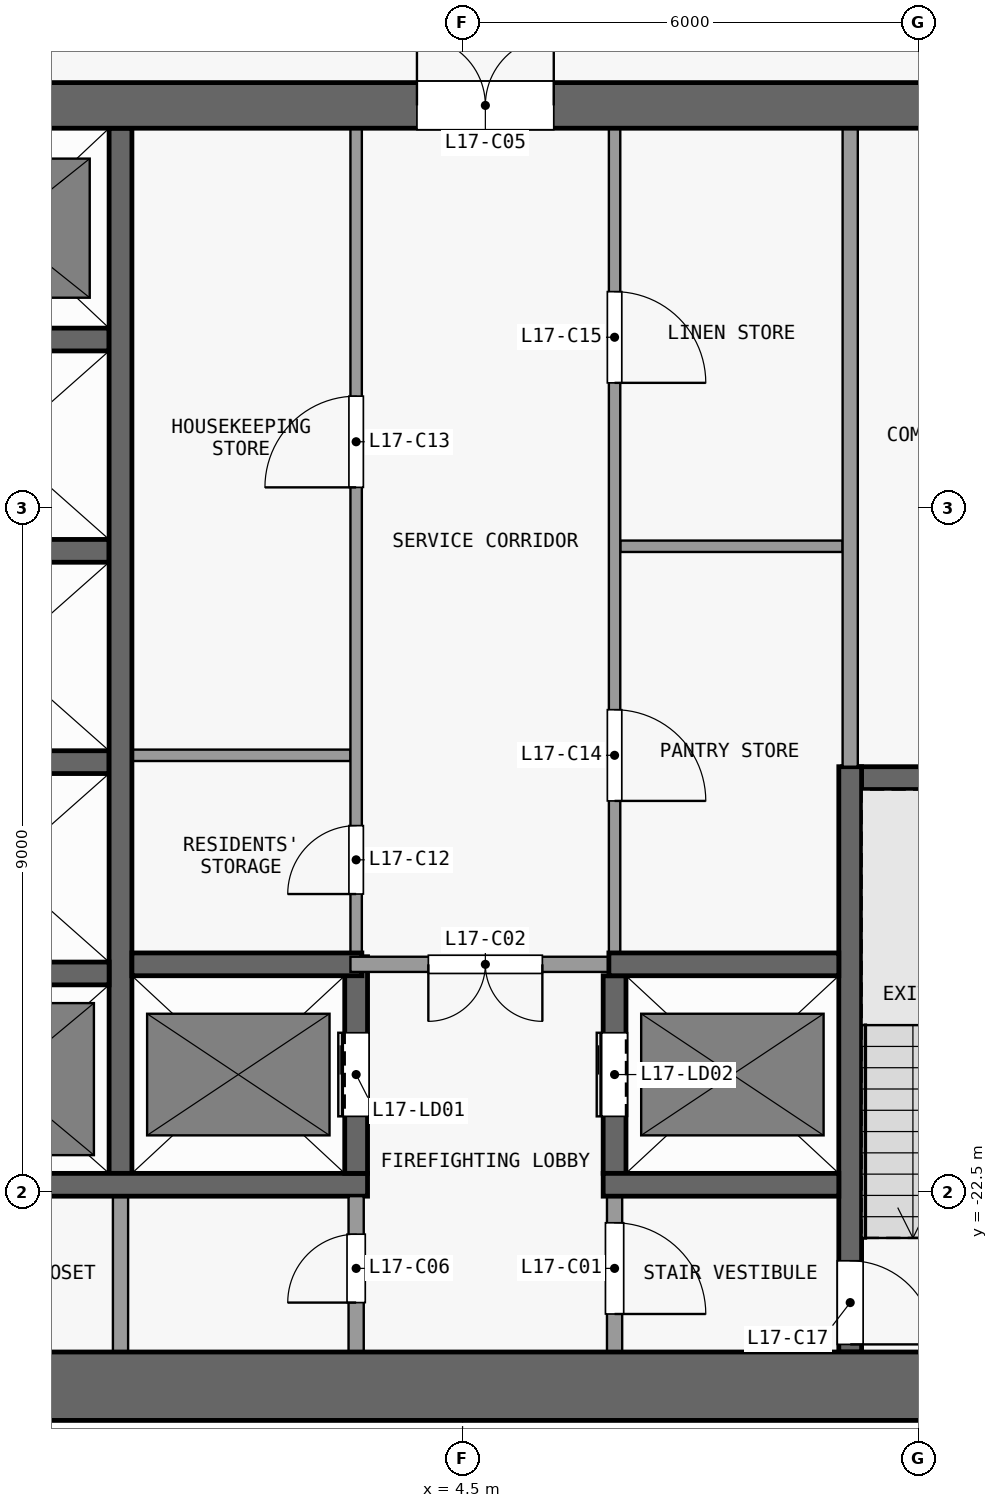
"""IFC4 building model, lengths in metres.
Left out: names, types, materials, properties, quantities, classifications, styles, units other than length and angle.
Written with IfcOpenShell. Run it as: python <this file> out.ifc"""

import sys

from ifc_helpers import new_model, si_unit, direction, frame, frame_2d, origin, place, context, subcontext, project, spatial, rectangle, extrude, element, fill, save


model = new_model("IFC4")
c1 = context("Model", 3, precision=1e-05, world=origin(), true_north=direction((0.0, 1.0)))
c2 = subcontext(c1, "Body", "Model", "MODEL_VIEW")
j1 = project(units=[si_unit("LENGTHUNIT", "METRE"), si_unit("PLANEANGLEUNIT", "RADIAN")], contexts=[c1])
p1 = place(None, origin())
s1 = spatial("IfcSite", under=j1, at=p1, CompositionType="ELEMENT")
p2 = place(p1, origin())
s2 = spatial("IfcBuilding", under=s1, at=p2, CompositionType="ELEMENT")
p3 = place(p2, frame((0.0, 0.0, 72.1)))
s3 = spatial("IfcBuildingStorey", under=s2, at=p3, CompositionType="ELEMENT", Elevation=72.1)
p4 = place(p3, frame((-13.5, -25.05, 0.0), z_axis=(0.0, 0.0, 1.0), x_axis=(1.0, 0.0, 0.0)))
e1 = element("IfcWall", 1, at=p4, inside=s3, PredefinedType="SHEAR", context=c2, shape_type="SweptSolid", body=[
    extrude(rectangle(XDim=27.0, YDim=0.9, at=frame_2d((13.5, 0.0))), origin(), (0.0, 0.0, 1.0), 3.15),
])
p5 = place(p3, frame((-13.5, -8.2, 0.0), z_axis=(0.0, 0.0, 1.0), x_axis=(1.0, 0.0, 0.0)))
e2 = element("IfcWall", 2, at=p5, inside=s3, PredefinedType="SHEAR", context=c2, shape_type="SweptSolid", body=[
    extrude(rectangle(XDim=27.0, YDim=0.6, at=frame_2d((13.5, 0.0))), origin(), (0.0, 0.0, 1.0), 3.15),
])
p6 = place(p5, frame((7.8, 0.0, 0.0)))
e3 = element("IfcOpeningElement", 3, at=p6, cuts=e2, PredefinedType="OPENING", context=c2, shape_type="SweptSolid", body=[
    extrude(rectangle(XDim=1.8, YDim=2.1, at=frame_2d((0.9, 1.05))), frame((0.0, 0.31, 0.0), z_axis=(0.0, -1.0, 0.0), x_axis=(1.0, 0.0, 0.0)), (0.0, 0.0, 1.0), 0.62),
])
p7 = place(p5, frame((17.4, 0.0, 0.0)))
e4 = element("IfcOpeningElement", 4, at=p7, cuts=e2, PredefinedType="OPENING", context=c2, shape_type="SweptSolid", body=[
    extrude(rectangle(XDim=1.8, YDim=2.1, at=frame_2d((0.9, 1.05))), frame((0.0, 0.31, 0.0), z_axis=(0.0, -1.0, 0.0), x_axis=(1.0, 0.0, 0.0)), (0.0, 0.0, 1.0), 0.62),
])
p8 = place(p5, frame((2.725, 0.0, 0.0)))
e5 = element("IfcOpeningElement", 5, at=p8, cuts=e2, PredefinedType="OPENING", context=c2, shape_type="SweptSolid", body=[
    extrude(rectangle(XDim=0.9, YDim=2.1, at=frame_2d((0.45, 1.05))), frame((0.0, 0.31, 0.0), z_axis=(0.0, -1.0, 0.0), x_axis=(1.0, 0.0, 0.0)), (0.0, 0.0, 1.0), 0.62),
])
p9 = place(p5, frame((24.075, 0.0, 0.0)))
e6 = element("IfcOpeningElement", 6, at=p9, cuts=e2, PredefinedType="OPENING", context=c2, shape_type="SweptSolid", body=[
    extrude(rectangle(XDim=1.2, YDim=2.1, at=frame_2d((0.6, 1.05))), frame((0.0, 0.31, 0.0), z_axis=(0.0, -1.0, 0.0), x_axis=(1.0, 0.0, 0.0)), (0.0, 0.0, 1.0), 0.62),
])
p10 = place(p3, frame((-2.95, -22.4, 0.0), z_axis=(0.0, 0.0, 1.0), x_axis=(1.0, 0.0, 0.0)))
e7 = element("IfcWall", 7, at=p10, inside=s3, PredefinedType="SHEAR", context=c2, shape_type="SweptSolid", body=[
    extrude(rectangle(XDim=6.2, YDim=0.3, at=frame_2d((3.1, 0.0))), origin(), (0.0, 0.0, 1.0), 3.15),
])
p11 = place(p3, frame((6.35, -22.4, 0.0), z_axis=(0.0, 0.0, 1.0), x_axis=(1.0, 0.0, 0.0)))
e8 = element("IfcWall", 8, at=p11, inside=s3, PredefinedType="SHEAR", context=c2, shape_type="SweptSolid", body=[
    extrude(rectangle(XDim=3.1, YDim=0.3, at=frame_2d((1.55, 0.0))), origin(), (0.0, 0.0, 1.0), 3.15),
])
p12 = place(p3, frame((-2.95, -19.62, 0.0), z_axis=(0.0, 0.0, 1.0), x_axis=(1.0, 0.0, 0.0)))
e9 = element("IfcWall", 9, at=p12, inside=s3, PredefinedType="SHEAR", context=c2, shape_type="SweptSolid", body=[
    extrude(rectangle(XDim=2.8, YDim=0.3, at=frame_2d((1.4, 0.0))), origin(), (0.0, 0.0, 1.0), 3.15),
])
p13 = place(p3, frame((0.15, -19.5, 0.0), z_axis=(0.0, 0.0, 1.0), x_axis=(1.0, 0.0, 0.0)))
e10 = element("IfcWall", 10, at=p13, inside=s3, PredefinedType="SHEAR", context=c2, shape_type="SweptSolid", body=[
    extrude(rectangle(XDim=3.025, YDim=0.3, at=frame_2d((1.513, 0.0))), origin(), (0.0, 0.0, 1.0), 3.15),
])
p14 = place(p3, frame((6.575, -19.5, 0.0), z_axis=(0.0, 0.0, 1.0), x_axis=(-1.0, 0.0, 0.0)))
e11 = element("IfcWall", 11, at=p14, inside=s3, PredefinedType="PARTITIONING", context=c2, shape_type="SweptSolid", body=[
    extrude(rectangle(XDim=3.55, YDim=0.2, at=frame_2d((1.775, 0.0))), origin(), (0.0, 0.0, 1.0), 3.15),
])
p15 = place(p14, frame((1.025, 0.0, 0.0)))
e12 = element("IfcOpeningElement", 12, at=p15, cuts=e11, PredefinedType="OPENING", context=c2, shape_type="SweptSolid", body=[
    extrude(rectangle(XDim=1.5, YDim=2.1, at=frame_2d((0.75, 1.05))), frame((0.0, 0.11, 0.0), z_axis=(0.0, -1.0, 0.0), x_axis=(1.0, 0.0, 0.0)), (0.0, 0.0, 1.0), 0.22),
])
p16 = place(p3, frame((6.425, -19.5, 0.0), z_axis=(0.0, 0.0, 1.0), x_axis=(1.0, 0.0, 0.0)))
e13 = element("IfcWall", 13, at=p16, inside=s3, PredefinedType="SHEAR", context=c2, shape_type="SweptSolid", body=[
    extrude(rectangle(XDim=3.025, YDim=0.3, at=frame_2d((1.512, 0.0))), origin(), (0.0, 0.0, 1.0), 3.15),
])
p17 = place(p3, frame((9.5, -17.05, 0.0), z_axis=(0.0, 0.0, 1.0), x_axis=(1.0, 0.0, 0.0)))
e14 = element("IfcWall", 14, at=p17, inside=s3, PredefinedType="SHEAR", context=c2, shape_type="SweptSolid", body=[
    extrude(rectangle(XDim=3.1, YDim=0.3, at=frame_2d((1.55, 0.0))), origin(), (0.0, 0.0, 1.0), 3.15),
])
p18 = place(p3, frame((-2.95, -16.84, 0.0), z_axis=(0.0, 0.0, 1.0), x_axis=(1.0, 0.0, 0.0)))
e15 = element("IfcWall", 15, at=p18, inside=s3, PredefinedType="SHEAR", context=c2, shape_type="SweptSolid", body=[
    extrude(rectangle(XDim=2.8, YDim=0.3, at=frame_2d((1.4, 0.0))), origin(), (0.0, 0.0, 1.0), 3.15),
])
p19 = place(p3, frame((0.15, -16.75, 0.0), z_axis=(0.0, 0.0, 1.0), x_axis=(1.0, 0.0, 0.0)))
e16 = element("IfcWall", 16, at=p19, inside=s3, PredefinedType="PARTITIONING", context=c2, shape_type="SweptSolid", body=[
    extrude(rectangle(XDim=2.875, YDim=0.15, at=frame_2d((1.438, 0.0))), origin(), (0.0, 0.0, 1.0), 3.15),
])
p20 = place(p3, frame((-2.95, -14.06, 0.0), z_axis=(0.0, 0.0, 1.0), x_axis=(1.0, 0.0, 0.0)))
e17 = element("IfcWall", 17, at=p20, inside=s3, PredefinedType="SHEAR", context=c2, shape_type="SweptSolid", body=[
    extrude(rectangle(XDim=2.8, YDim=0.3, at=frame_2d((1.4, 0.0))), origin(), (0.0, 0.0, 1.0), 3.15),
])
p21 = place(p3, frame((6.575, -14.0, 0.0), z_axis=(0.0, 0.0, 1.0), x_axis=(1.0, 0.0, 0.0)))
e18 = element("IfcWall", 18, at=p21, inside=s3, PredefinedType="PARTITIONING", context=c2, shape_type="SweptSolid", body=[
    extrude(rectangle(XDim=2.925, YDim=0.15, at=frame_2d((1.462, 0.0))), origin(), (0.0, 0.0, 1.0), 3.15),
])
p22 = place(p3, frame((-2.95, -11.28, 0.0), z_axis=(0.0, 0.0, 1.0), x_axis=(1.0, 0.0, 0.0)))
e19 = element("IfcWall", 19, at=p22, inside=s3, PredefinedType="SHEAR", context=c2, shape_type="SweptSolid", body=[
    extrude(rectangle(XDim=2.8, YDim=0.3, at=frame_2d((1.4, 0.0))), origin(), (0.0, 0.0, 1.0), 3.15),
])
p23 = place(p3, frame((0.0, -24.6, 0.0), z_axis=(0.0, 0.0, 1.0), x_axis=(0.0, 1.0, 0.0)))
e20 = element("IfcWall", 20, at=p23, inside=s3, PredefinedType="PARTITIONING", context=c2, shape_type="SweptSolid", body=[
    extrude(rectangle(XDim=2.05, YDim=0.2, at=frame_2d((1.025, 0.0))), origin(), (0.0, 0.0, 1.0), 3.15),
])
p24 = place(p3, frame((0.0, -22.25, 0.0), z_axis=(0.0, 0.0, 1.0), x_axis=(0.0, 1.0, 0.0)))
e21 = element("IfcWall", 21, at=p24, inside=s3, PredefinedType="SHEAR", context=c2, shape_type="SweptSolid", body=[
    extrude(rectangle(XDim=13.75, YDim=0.3, at=frame_2d((6.875, 0.0))), origin(), (0.0, 0.0, 1.0), 3.15),
])
p25 = place(p3, frame((3.1, -24.6, 0.0), z_axis=(0.0, 0.0, 1.0), x_axis=(0.0, 1.0, 0.0)))
e22 = element("IfcWall", 22, at=p25, inside=s3, PredefinedType="PARTITIONING", context=c2, shape_type="SweptSolid", body=[
    extrude(rectangle(XDim=2.05, YDim=0.2, at=frame_2d((1.025, 0.0))), origin(), (0.0, 0.0, 1.0), 3.15),
])
p26 = place(p25, frame((0.65, 0.0, 0.0)))
e23 = element("IfcOpeningElement", 23, at=p26, cuts=e22, PredefinedType="OPENING", context=c2, shape_type="SweptSolid", body=[
    extrude(rectangle(XDim=0.9, YDim=2.1, at=frame_2d((0.45, 1.05))), frame((0.0, 0.11, 0.0), z_axis=(0.0, -1.0, 0.0), x_axis=(1.0, 0.0, 0.0)), (0.0, 0.0, 1.0), 0.22),
])
p27 = place(p3, frame((3.1, -22.25, 0.0), z_axis=(0.0, 0.0, 1.0), x_axis=(0.0, 1.0, 0.0)))
e24 = element("IfcWall", 24, at=p27, inside=s3, PredefinedType="SHEAR", context=c2, shape_type="SweptSolid", body=[
    extrude(rectangle(XDim=2.85, YDim=0.3, at=frame_2d((1.425, 0.0))), origin(), (0.0, 0.0, 1.0), 3.15),
])
p28 = place(p27, frame((0.75, 0.0, 0.0)))
e25 = element("IfcOpeningElement", 25, at=p28, cuts=e24, PredefinedType="OPENING", context=c2, shape_type="SweptSolid", body=[
    extrude(rectangle(XDim=1.1, YDim=2.1, at=frame_2d((0.55, 1.05))), frame((0.0, 0.16, 0.0), z_axis=(0.0, -1.0, 0.0), x_axis=(1.0, 0.0, 0.0)), (0.0, 0.0, 1.0), 0.32),
])
p29 = place(p3, frame((3.1, -19.4, 0.0), z_axis=(0.0, 0.0, 1.0), x_axis=(0.0, 1.0, 0.0)))
e26 = element("IfcWall", 26, at=p29, inside=s3, PredefinedType="PARTITIONING", context=c2, shape_type="SweptSolid", body=[
    extrude(rectangle(XDim=10.9, YDim=0.15, at=frame_2d((5.45, 0.0))), origin(), (0.0, 0.0, 1.0), 3.15),
])
p30 = place(p29, frame((0.825, 0.0, 0.0)))
e27 = element("IfcOpeningElement", 27, at=p30, cuts=e26, PredefinedType="OPENING", context=c2, shape_type="SweptSolid", body=[
    extrude(rectangle(XDim=0.9, YDim=2.1, at=frame_2d((0.45, 1.05))), frame((0.0, 0.085, 0.0), z_axis=(0.0, -1.0, 0.0), x_axis=(1.0, 0.0, 0.0)), (0.0, 0.0, 1.0), 0.17),
])
p31 = place(p29, frame((6.175, 0.0, 0.0)))
e28 = element("IfcOpeningElement", 28, at=p31, cuts=e26, PredefinedType="OPENING", context=c2, shape_type="SweptSolid", body=[
    extrude(rectangle(XDim=1.2, YDim=2.1, at=frame_2d((0.6, 1.05))), frame((0.0, 0.085, 0.0), z_axis=(0.0, -1.0, 0.0), x_axis=(1.0, 0.0, 0.0)), (0.0, 0.0, 1.0), 0.17),
])
p32 = place(p3, frame((6.5, -22.55, 0.0), z_axis=(0.0, 0.0, 1.0), x_axis=(0.0, -1.0, 0.0)))
e29 = element("IfcWall", 29, at=p32, inside=s3, PredefinedType="PARTITIONING", context=c2, shape_type="SweptSolid", body=[
    extrude(rectangle(XDim=2.05, YDim=0.2, at=frame_2d((1.025, 0.0))), origin(), (0.0, 0.0, 1.0), 3.15),
])
p33 = place(p32, frame((0.35, 0.0, 0.0)))
e30 = element("IfcOpeningElement", 30, at=p33, cuts=e29, PredefinedType="OPENING", context=c2, shape_type="SweptSolid", body=[
    extrude(rectangle(XDim=1.2, YDim=2.1, at=frame_2d((0.6, 1.05))), frame((0.0, 0.11, 0.0), z_axis=(0.0, -1.0, 0.0), x_axis=(1.0, 0.0, 0.0)), (0.0, 0.0, 1.0), 0.22),
])
p34 = place(p3, frame((6.5, -22.25, 0.0), z_axis=(0.0, 0.0, 1.0), x_axis=(0.0, 1.0, 0.0)))
e31 = element("IfcWall", 31, at=p34, inside=s3, PredefinedType="SHEAR", context=c2, shape_type="SweptSolid", body=[
    extrude(rectangle(XDim=2.6, YDim=0.3, at=frame_2d((1.3, 0.0))), origin(), (0.0, 0.0, 1.0), 3.15),
])
p35 = place(p34, frame((0.75, 0.0, 0.0)))
e32 = element("IfcOpeningElement", 32, at=p35, cuts=e31, PredefinedType="OPENING", context=c2, shape_type="SweptSolid", body=[
    extrude(rectangle(XDim=1.1, YDim=2.1, at=frame_2d((0.55, 1.05))), frame((0.0, 0.16, 0.0), z_axis=(0.0, -1.0, 0.0), x_axis=(1.0, 0.0, 0.0)), (0.0, 0.0, 1.0), 0.32),
])
p36 = place(p3, frame((6.5, -8.5, 0.0), z_axis=(0.0, 0.0, 1.0), x_axis=(0.0, -1.0, 0.0)))
e33 = element("IfcWall", 33, at=p36, inside=s3, PredefinedType="PARTITIONING", context=c2, shape_type="SweptSolid", body=[
    extrude(rectangle(XDim=10.85, YDim=0.15, at=frame_2d((5.425, 0.0))), origin(), (0.0, 0.0, 1.0), 3.15),
])
p37 = place(p36, frame((7.65, 0.0, 0.0)))
e34 = element("IfcOpeningElement", 34, at=p37, cuts=e33, PredefinedType="OPENING", context=c2, shape_type="SweptSolid", body=[
    extrude(rectangle(XDim=1.2, YDim=2.1, at=frame_2d((0.6, 1.05))), frame((0.0, 0.085, 0.0), z_axis=(0.0, -1.0, 0.0), x_axis=(1.0, 0.0, 0.0)), (0.0, 0.0, 1.0), 0.17),
])
p38 = place(p36, frame((2.15, 0.0, 0.0)))
e35 = element("IfcOpeningElement", 35, at=p38, cuts=e33, PredefinedType="OPENING", context=c2, shape_type="SweptSolid", body=[
    extrude(rectangle(XDim=1.2, YDim=2.1, at=frame_2d((0.6, 1.05))), frame((0.0, 0.085, 0.0), z_axis=(0.0, -1.0, 0.0), x_axis=(1.0, 0.0, 0.0)), (0.0, 0.0, 1.0), 0.17),
])
p39 = place(p3, frame((9.6, -16.9, 0.0), z_axis=(0.0, 0.0, 1.0), x_axis=(0.0, -1.0, 0.0)))
e36 = element("IfcWall", 36, at=p39, inside=s3, PredefinedType="SHEAR", context=c2, shape_type="SweptSolid", body=[
    extrude(rectangle(XDim=7.7, YDim=0.3, at=frame_2d((3.85, 0.0))), origin(), (0.0, 0.0, 1.0), 3.15),
])
p40 = place(p39, frame((6.5, 0.0, 0.0)))
e37 = element("IfcOpeningElement", 37, at=p40, cuts=e36, PredefinedType="OPENING", context=c2, shape_type="SweptSolid", body=[
    extrude(rectangle(XDim=1.1, YDim=2.1, at=frame_2d((0.55, 1.05))), frame((0.0, 0.16, 0.0), z_axis=(0.0, -1.0, 0.0), x_axis=(1.0, 0.0, 0.0)), (0.0, 0.0, 1.0), 0.32),
])
p41 = place(p3, frame((9.6, -16.9, 0.0), z_axis=(0.0, 0.0, 1.0), x_axis=(0.0, 1.0, 0.0)))
e38 = element("IfcWall", 38, at=p41, inside=s3, PredefinedType="PARTITIONING", context=c2, shape_type="SweptSolid", body=[
    extrude(rectangle(XDim=8.4, YDim=0.2, at=frame_2d((4.2, 0.0))), origin(), (0.0, 0.0, 1.0), 3.15),
])
p42 = place(p28, origin())
e39 = element("IfcDoor", 39, at=p42, inside=s3, OperationType="DOUBLE_DOOR_SLIDING", PredefinedType="DOOR", context=c2, shape_type="SweptSolid", body=[
    extrude(rectangle(XDim=1.1, YDim=2.1, at=frame_2d((0.55, 1.05))), frame((0.0, 0.025, 0.0), z_axis=(0.0, -1.0, 0.0), x_axis=(1.0, 0.0, 0.0)), (0.0, 0.0, 1.0), 0.05),
])
fill(e25, e39)
p43 = place(p35, origin())
e40 = element("IfcDoor", 40, at=p43, inside=s3, OperationType="DOUBLE_DOOR_SLIDING", PredefinedType="DOOR", context=c2, shape_type="SweptSolid", body=[
    extrude(rectangle(XDim=1.1, YDim=2.1, at=frame_2d((0.55, 1.05))), frame((0.0, 0.025, 0.0), z_axis=(0.0, -1.0, 0.0), x_axis=(1.0, 0.0, 0.0)), (0.0, 0.0, 1.0), 0.05),
])
fill(e32, e40)
p44 = place(p33, origin())
e41 = element("IfcDoor", 41, at=p44, inside=s3, OperationType="SINGLE_SWING_RIGHT", PredefinedType="DOOR", context=c2, shape_type="SweptSolid", body=[
    extrude(rectangle(XDim=1.2, YDim=2.1, at=frame_2d((0.6, 1.05))), frame((0.0, 0.025, 0.0), z_axis=(0.0, -1.0, 0.0), x_axis=(1.0, 0.0, 0.0)), (0.0, 0.0, 1.0), 0.05),
])
fill(e30, e41)
p45 = place(p15, origin())
e42 = element("IfcDoor", 42, at=p45, inside=s3, OperationType="DOUBLE_DOOR_SINGLE_SWING", PredefinedType="DOOR", context=c2, shape_type="SweptSolid", body=[
    extrude(rectangle(XDim=1.5, YDim=2.1, at=frame_2d((0.75, 1.05))), frame((0.0, 0.025, 0.0), z_axis=(0.0, -1.0, 0.0), x_axis=(1.0, 0.0, 0.0)), (0.0, 0.0, 1.0), 0.05),
])
fill(e12, e42)
p46 = place(p7, origin())
e43 = element("IfcDoor", 43, at=p46, inside=s3, OperationType="DOUBLE_DOOR_SINGLE_SWING", PredefinedType="DOOR", context=c2, shape_type="SweptSolid", body=[
    extrude(rectangle(XDim=1.8, YDim=2.1, at=frame_2d((0.9, 1.05))), frame((0.0, 0.025, 0.0), z_axis=(0.0, -1.0, 0.0), x_axis=(1.0, 0.0, 0.0)), (0.0, 0.0, 1.0), 0.05),
])
fill(e4, e43)
p47 = place(p26, origin())
e44 = element("IfcDoor", 44, at=p47, inside=s3, OperationType="SINGLE_SWING_LEFT", PredefinedType="DOOR", context=c2, shape_type="SweptSolid", body=[
    extrude(rectangle(XDim=0.9, YDim=2.1, at=frame_2d((0.45, 1.05))), frame((0.0, 0.025, 0.0), z_axis=(0.0, -1.0, 0.0), x_axis=(1.0, 0.0, 0.0)), (0.0, 0.0, 1.0), 0.05),
])
fill(e23, e44)
p48 = place(p30, origin())
e45 = element("IfcDoor", 45, at=p48, inside=s3, OperationType="SINGLE_SWING_LEFT", PredefinedType="DOOR", context=c2, shape_type="SweptSolid", body=[
    extrude(rectangle(XDim=0.9, YDim=2.1, at=frame_2d((0.45, 1.05))), frame((0.0, 0.025, 0.0), z_axis=(0.0, -1.0, 0.0), x_axis=(1.0, 0.0, 0.0)), (0.0, 0.0, 1.0), 0.05),
])
fill(e27, e45)
p49 = place(p31, origin())
e46 = element("IfcDoor", 46, at=p49, inside=s3, OperationType="SINGLE_SWING_LEFT", PredefinedType="DOOR", context=c2, shape_type="SweptSolid", body=[
    extrude(rectangle(XDim=1.2, YDim=2.1, at=frame_2d((0.6, 1.05))), frame((0.0, 0.025, 0.0), z_axis=(0.0, -1.0, 0.0), x_axis=(1.0, 0.0, 0.0)), (0.0, 0.0, 1.0), 0.05),
])
fill(e28, e46)
p50 = place(p37, origin())
e47 = element("IfcDoor", 47, at=p50, inside=s3, OperationType="SINGLE_SWING_RIGHT", PredefinedType="DOOR", context=c2, shape_type="SweptSolid", body=[
    extrude(rectangle(XDim=1.2, YDim=2.1, at=frame_2d((0.6, 1.05))), frame((0.0, 0.025, 0.0), z_axis=(0.0, -1.0, 0.0), x_axis=(1.0, 0.0, 0.0)), (0.0, 0.0, 1.0), 0.05),
])
fill(e34, e47)
p51 = place(p38, origin())
e48 = element("IfcDoor", 48, at=p51, inside=s3, OperationType="SINGLE_SWING_RIGHT", PredefinedType="DOOR", context=c2, shape_type="SweptSolid", body=[
    extrude(rectangle(XDim=1.2, YDim=2.1, at=frame_2d((0.6, 1.05))), frame((0.0, 0.025, 0.0), z_axis=(0.0, -1.0, 0.0), x_axis=(1.0, 0.0, 0.0)), (0.0, 0.0, 1.0), 0.05),
])
fill(e35, e48)
p52 = place(p40, origin())
e49 = element("IfcDoor", 49, at=p52, inside=s3, OperationType="SINGLE_SWING_RIGHT", PredefinedType="DOOR", context=c2, shape_type="SweptSolid", body=[
    extrude(rectangle(XDim=1.1, YDim=2.1, at=frame_2d((0.55, 1.05))), frame((0.0, 0.025, 0.0), z_axis=(0.0, -1.0, 0.0), x_axis=(1.0, 0.0, 0.0)), (0.0, 0.0, 1.0), 0.05),
])
fill(e37, e49)
save(model, sys.argv[1])
